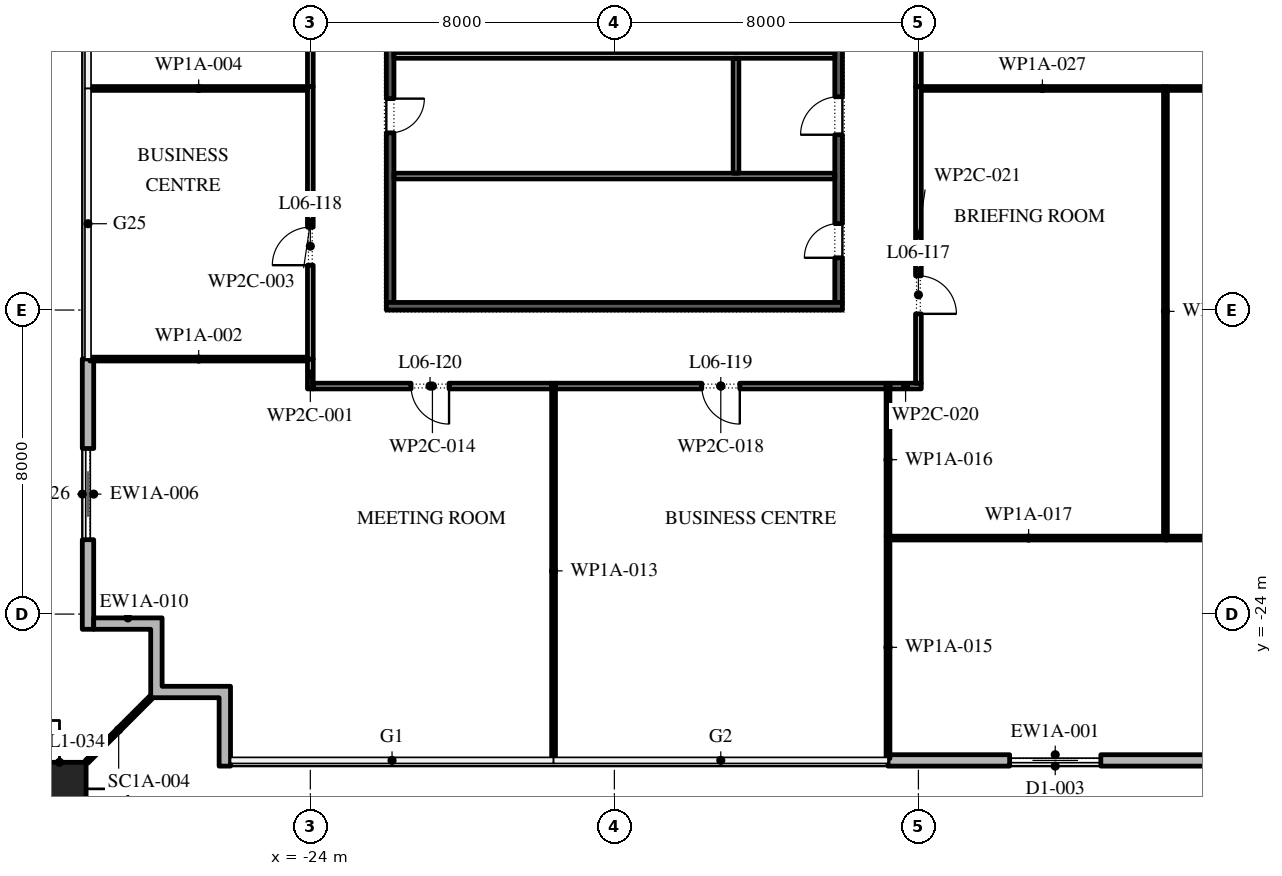
"""IFC4 building model, lengths in metres.
Left out: names, types, materials, properties, quantities, classifications, styles, units other than length and angle.
Written with IfcOpenShell. Run it as: python <this file> out.ifc"""

import sys

from ifc_helpers import new_model, si_unit, direction, frame, frame_2d, origin, origin_2d, place, context, subcontext, project, spatial, polyline, rectangle, outline, extrude, element, fill, save


model = new_model("IFC4")
c1 = context("Model", 3, precision=1e-05, world=origin(), true_north=direction((0.0, 1.0)))
c2 = subcontext(c1, "Body", "Model", "MODEL_VIEW")
j1 = project(units=[si_unit("LENGTHUNIT", "METRE"), si_unit("PLANEANGLEUNIT", "RADIAN")], contexts=[c1])
p1 = place(None, origin())
s1 = spatial("IfcSite", under=j1, at=p1, CompositionType="ELEMENT")
p2 = place(p1, origin())
s2 = spatial("IfcBuilding", under=s1, at=p2, CompositionType="ELEMENT")
p3 = place(p2, frame((0.0, 0.0, 33.6)))
s3 = spatial("IfcBuildingStorey", under=s2, at=p3, CompositionType="ELEMENT", Elevation=33.6)
p4 = place(p3, frame((-30.6, -28.6, 0.0), z_axis=(0.0, 0.0, 1.0), x_axis=(1.0, 0.0, 0.0)))
e1 = element("IfcColumn", 1, at=p4, inside=s3, PredefinedType="COLUMN", context=c2, shape_type="SweptSolid", body=[
    extrude(rectangle(XDim=1.4, YDim=1.4, at=origin_2d()), origin(), (0.0, 0.0, 1.0), 6.0),
])
p5 = place(p3, frame((-8.8, -27.85, 0.0), z_axis=(0.0, 0.0, 1.0), x_axis=(1.0, 0.0, 0.0)))
e2 = element("IfcWall", 2, at=p5, inside=s3, PredefinedType="STANDARD", context=c2, shape_type="SweptSolid", body=[
    extrude(rectangle(XDim=8.8, YDim=0.3, at=frame_2d((4.4, 0.0))), origin(), (0.0, 0.0, 1.0), 5.8),
])
p6 = place(p5, frame((3.2, 0.0, 0.0)))
e3 = element("IfcOpeningElement", 3, at=p6, cuts=e2, PredefinedType="OPENING", context=c2, shape_type="SweptSolid", body=[
    extrude(rectangle(XDim=2.4, YDim=3.5, at=frame_2d((1.2, 1.75))), frame((0.0, 0.16, 0.0), z_axis=(0.0, -1.0, 0.0), x_axis=(1.0, 0.0, 0.0)), (0.0, 0.0, 1.0), 0.32),
])
p7 = place(p3, frame((-29.85, -17.286, 0.0), z_axis=(0.0, 0.0, 1.0), x_axis=(0.0, -1.0, 0.0)))
e4 = element("IfcWall", 4, at=p7, inside=s3, PredefinedType="STANDARD", context=c2, shape_type="SweptSolid", body=[
    extrude(rectangle(XDim=7.114, YDim=0.3, at=frame_2d((3.557, 0.0))), origin(), (0.0, 0.0, 1.0), 5.8),
])
p8 = place(p7, frame((2.357, 0.0, 0.0)))
e5 = element("IfcOpeningElement", 5, at=p8, cuts=e4, PredefinedType="OPENING", context=c2, shape_type="SweptSolid", body=[
    extrude(rectangle(XDim=2.4, YDim=3.5, at=frame_2d((1.2, 1.75))), frame((0.0, 0.16, 0.0), z_axis=(0.0, -1.0, 0.0), x_axis=(1.0, 0.0, 0.0)), (0.0, 0.0, 1.0), 0.32),
])
p9 = place(p3, origin())
e6 = element("IfcWall", 6, at=p9, inside=s3, PredefinedType="STANDARD", context=c2, shape_type="SweptSolid", body=[
    extrude(outline(polyline([(-26.4, -26.2), (-28.2, -26.2), (-28.2, -24.4), (-29.7, -24.4), (-29.7, -24.1), (-27.9, -24.1), (-27.9, -25.9), (-26.1, -25.9), (-26.1, -28.0), (-26.4, -28.0), (-26.4, -26.2)])), origin(), (0.0, 0.0, 1.0), 5.8),
])
p10 = place(p3, frame((-28.2, -26.2, 0.0), z_axis=(0.0, 0.0, 1.0), x_axis=(-0.707106781187, -0.707106781187, 0.0)))
e7 = element("IfcWall", 7, at=p10, inside=s3, PredefinedType="STANDARD", context=c2, shape_type="SweptSolid", body=[
    extrude(rectangle(XDim=2.385, YDim=0.1, at=frame_2d((1.192, 0.0))), origin(), (0.0, 0.0, 1.0), 5.8),
])
p11 = place(p3, frame((-21.9, -15.8, 0.0), z_axis=(0.0, 0.0, 1.0), x_axis=(0.0, 1.0, 0.0)))
e8 = element("IfcWall", 8, at=p11, inside=s3, PredefinedType="SHEAR", context=c2, shape_type="SweptSolid", body=[
    extrude(rectangle(XDim=13.05, YDim=0.2, at=frame_2d((6.525, 0.0))), origin(), (0.0, 0.0, 1.0), 5.8),
])
p12 = place(p11, frame((4.462, 0.0, 0.0)))
e9 = element("IfcOpeningElement", 9, at=p12, cuts=e8, PredefinedType="OPENING", context=c2, shape_type="SweptSolid", body=[
    extrude(rectangle(XDim=0.9, YDim=2.1, at=frame_2d((0.45, 1.05))), frame((0.0, 0.11, 0.0), z_axis=(0.0, -1.0, 0.0), x_axis=(1.0, 0.0, 0.0)), (0.0, 0.0, 1.0), 0.22),
])
p13 = place(p3, frame((-10.1, -15.8, 0.0), z_axis=(0.0, 0.0, 1.0), x_axis=(0.0, 1.0, 0.0)))
e10 = element("IfcWall", 10, at=p13, inside=s3, PredefinedType="SHEAR", context=c2, shape_type="SweptSolid", body=[
    extrude(rectangle(XDim=13.05, YDim=0.2, at=frame_2d((6.525, 0.0))), origin(), (0.0, 0.0, 1.0), 5.8),
])
p14 = place(p13, frame((1.175, 0.0, 0.0)))
e11 = element("IfcOpeningElement", 11, at=p14, cuts=e10, PredefinedType="OPENING", context=c2, shape_type="SweptSolid", body=[
    extrude(rectangle(XDim=0.9, YDim=2.1, at=frame_2d((0.45, 1.05))), frame((0.0, 0.11, 0.0), z_axis=(0.0, -1.0, 0.0), x_axis=(1.0, 0.0, 0.0)), (0.0, 0.0, 1.0), 0.22),
])
p15 = place(p13, frame((4.413, 0.0, 0.0)))
e12 = element("IfcOpeningElement", 12, at=p15, cuts=e10, PredefinedType="OPENING", context=c2, shape_type="SweptSolid", body=[
    extrude(rectangle(XDim=1.0, YDim=2.1, at=frame_2d((0.5, 1.05))), frame((0.0, 0.11, 0.0), z_axis=(0.0, -1.0, 0.0), x_axis=(1.0, 0.0, 0.0)), (0.0, 0.0, 1.0), 0.22),
])
p16 = place(p13, frame((9.363, 0.0, 0.0)))
e13 = element("IfcOpeningElement", 13, at=p16, cuts=e10, PredefinedType="OPENING", context=c2, shape_type="SweptSolid", body=[
    extrude(rectangle(XDim=0.9, YDim=2.1, at=frame_2d((0.45, 1.05))), frame((0.0, 0.11, 0.0), z_axis=(0.0, -1.0, 0.0), x_axis=(1.0, 0.0, 0.0)), (0.0, 0.0, 1.0), 0.22),
])
p17 = place(p3, frame((-22.0, -15.9, 0.0), z_axis=(0.0, 0.0, 1.0), x_axis=(1.0, 0.0, 0.0)))
e14 = element("IfcWall", 14, at=p17, inside=s3, PredefinedType="SHEAR", context=c2, shape_type="SweptSolid", body=[
    extrude(rectangle(XDim=12.0, YDim=0.2, at=frame_2d((6.0, 0.0))), origin(), (0.0, 0.0, 1.0), 5.8),
])
for number, where, z_axis, x_axis in (
    (15, (-21.8, -9.3, 0.0), (0.0, 0.0, 1.0), (1.0, 0.0, 0.0)),
    (16, (-21.8, -12.475, 0.0), (0.0, 0.0, 1.0), (1.0, 0.0, 0.0)),
):
    element("IfcWall", number, at=place(p3, frame(where, z_axis=z_axis, x_axis=x_axis)), inside=s3, PredefinedType="PARTITIONING", context=c2, shape_type="SweptSolid", body=[
        extrude(rectangle(XDim=11.6, YDim=0.15, at=frame_2d((5.8, 0.0))), origin(), (0.0, 0.0, 1.0), 5.8),
    ])
p18 = place(p3, frame((-12.8, -12.4, 0.0), z_axis=(0.0, 0.0, 1.0), x_axis=(0.0, 1.0, 0.0)))
e17 = element("IfcWall", 17, at=p18, inside=s3, PredefinedType="PARTITIONING", context=c2, shape_type="SweptSolid", body=[
    extrude(rectangle(XDim=3.025, YDim=0.15, at=frame_2d((1.512, 0.0))), origin(), (0.0, 0.0, 1.0), 5.8),
])
p19 = place(p3, frame((-24.0, -18.075, 0.0), z_axis=(0.0, 0.0, 1.0), x_axis=(0.0, 1.0, 0.0)))
e18 = element("IfcWall", 18, at=p19, inside=s3, PredefinedType="PARTITIONING", context=c2, shape_type="SweptSolid", body=[
    extrude(rectangle(XDim=0.785, YDim=0.15, at=frame_2d((0.393, 0.0))), origin(), (0.0, 0.0, 1.0), 5.8),
])
p20 = place(p3, frame((-24.075, -17.29, 0.0), z_axis=(0.0, 0.0, 1.0), x_axis=(-1.0, 0.0, 0.0)))
e19 = element("IfcWall", 19, at=p20, inside=s3, PredefinedType="PARTITIONING", context=c2, shape_type="SweptSolid", body=[
    extrude(rectangle(XDim=5.725, YDim=0.1, at=frame_2d((2.863, 0.0))), origin(), (0.0, 0.0, 1.0), 5.8),
])
p21 = place(p3, frame((-24.0, -17.29, 0.0), z_axis=(0.0, 0.0, 1.0), x_axis=(0.0, 1.0, 0.0)))
e20 = element("IfcWall", 20, at=p21, inside=s3, PredefinedType="PARTITIONING", context=c2, shape_type="SweptSolid", body=[
    extrude(rectangle(XDim=7.17, YDim=0.15, at=frame_2d((3.585, 0.0))), origin(), (0.0, 0.0, 1.0), 5.8),
])
p22 = place(p21, frame((2.47, 0.0, 0.0)))
e21 = element("IfcOpeningElement", 21, at=p22, cuts=e20, PredefinedType="OPENING", context=c2, shape_type="SweptSolid", body=[
    extrude(rectangle(XDim=1.0, YDim=2.1, at=frame_2d((0.5, 1.05))), frame((0.0, 0.085, 0.0), z_axis=(0.0, -1.0, 0.0), x_axis=(1.0, 0.0, 0.0)), (0.0, 0.0, 1.0), 0.17),
])
p23 = place(p3, frame((-24.075, -10.17, 0.0), z_axis=(0.0, 0.0, 1.0), x_axis=(-1.0, 0.0, 0.0)))
e22 = element("IfcWall", 22, at=p23, inside=s3, PredefinedType="PARTITIONING", context=c2, shape_type="SweptSolid", body=[
    extrude(rectangle(XDim=5.725, YDim=0.1, at=frame_2d((2.863, 0.0))), origin(), (0.0, 0.0, 1.0), 5.8),
])
p24 = place(p3, frame((-24.0, -10.12, 0.0), z_axis=(0.0, 0.0, 1.0), x_axis=(0.0, 1.0, 0.0)))
e23 = element("IfcWall", 23, at=p24, inside=s3, PredefinedType="PARTITIONING", context=c2, shape_type="SweptSolid", body=[
    extrude(rectangle(XDim=7.06, YDim=0.15, at=frame_2d((3.53, 0.0))), origin(), (0.0, 0.0, 1.0), 5.8),
])
p25 = place(p24, frame((2.41, 0.0, 0.0)))
e24 = element("IfcOpeningElement", 24, at=p25, cuts=e23, PredefinedType="OPENING", context=c2, shape_type="SweptSolid", body=[
    extrude(rectangle(XDim=1.0, YDim=2.1, at=frame_2d((0.5, 1.05))), frame((0.0, 0.085, 0.0), z_axis=(0.0, -1.0, 0.0), x_axis=(1.0, 0.0, 0.0)), (0.0, 0.0, 1.0), 0.17),
])
p26 = place(p3, frame((-17.6, -27.8, 0.0), z_axis=(0.0, 0.0, 1.0), x_axis=(0.0, 1.0, 0.0)))
e25 = element("IfcWall", 25, at=p26, inside=s3, PredefinedType="PARTITIONING", context=c2, shape_type="SweptSolid", body=[
    extrude(rectangle(XDim=9.875, YDim=0.1, at=frame_2d((4.938, 0.0))), origin(), (0.0, 0.0, 1.0), 5.8),
])
p27 = place(p3, frame((-17.65, -18.0, 0.0), z_axis=(0.0, 0.0, 1.0), x_axis=(-1.0, 0.0, 0.0)))
e26 = element("IfcWall", 26, at=p27, inside=s3, PredefinedType="PARTITIONING", context=c2, shape_type="SweptSolid", body=[
    extrude(rectangle(XDim=6.275, YDim=0.15, at=frame_2d((3.138, 0.0))), origin(), (0.0, 0.0, 1.0), 5.8),
])
p28 = place(p27, frame((2.7, 0.0, 0.0)))
e27 = element("IfcOpeningElement", 27, at=p28, cuts=e26, PredefinedType="OPENING", context=c2, shape_type="SweptSolid", body=[
    extrude(rectangle(XDim=1.0, YDim=2.1, at=frame_2d((0.5, 1.05))), frame((0.0, 0.085, 0.0), z_axis=(0.0, -1.0, 0.0), x_axis=(1.0, 0.0, 0.0)), (0.0, 0.0, 1.0), 0.17),
])
p29 = place(p3, frame((-8.8, -27.8, 0.0), z_axis=(0.0, 0.0, 1.0), x_axis=(0.0, 1.0, 0.0)))
e28 = element("IfcWall", 28, at=p29, inside=s3, PredefinedType="PARTITIONING", context=c2, shape_type="SweptSolid", body=[
    extrude(rectangle(XDim=5.85, YDim=0.1, at=frame_2d((2.925, 0.0))), origin(), (0.0, 0.0, 1.0), 5.8),
])
p30 = place(p3, frame((-8.8, -21.95, 0.0), z_axis=(0.0, 0.0, 1.0), x_axis=(0.0, 1.0, 0.0)))
e29 = element("IfcWall", 29, at=p30, inside=s3, PredefinedType="PARTITIONING", context=c2, shape_type="SweptSolid", body=[
    extrude(rectangle(XDim=4.025, YDim=0.1, at=frame_2d((2.012, 0.0))), origin(), (0.0, 0.0, 1.0), 5.8),
])
p31 = place(p3, frame((-8.75, -22.0, 0.0), z_axis=(0.0, 0.0, 1.0), x_axis=(1.0, 0.0, 0.0)))
e30 = element("IfcWall", 30, at=p31, inside=s3, PredefinedType="PARTITIONING", context=c2, shape_type="SweptSolid", body=[
    extrude(rectangle(XDim=7.3, YDim=0.1, at=frame_2d((3.65, 0.0))), origin(), (0.0, 0.0, 1.0), 5.8),
])
p32 = place(p3, frame((-8.85, -18.0, 0.0), z_axis=(0.0, 0.0, 1.0), x_axis=(-1.0, 0.0, 0.0)))
e31 = element("IfcWall", 31, at=p32, inside=s3, PredefinedType="PARTITIONING", context=c2, shape_type="SweptSolid", body=[
    extrude(rectangle(XDim=8.7, YDim=0.15, at=frame_2d((4.35, 0.0))), origin(), (0.0, 0.0, 1.0), 5.8),
])
p33 = place(p32, frame((3.85, 0.0, 0.0)))
e32 = element("IfcOpeningElement", 32, at=p33, cuts=e31, PredefinedType="OPENING", context=c2, shape_type="SweptSolid", body=[
    extrude(rectangle(XDim=1.0, YDim=2.1, at=frame_2d((0.5, 1.05))), frame((0.0, 0.085, 0.0), z_axis=(0.0, -1.0, 0.0), x_axis=(1.0, 0.0, 0.0)), (0.0, 0.0, 1.0), 0.17),
])
p34 = place(p3, frame((-7.925, -18.0, 0.0), z_axis=(0.0, 0.0, 1.0), x_axis=(-1.0, 0.0, 0.0)))
e33 = element("IfcWall", 33, at=p34, inside=s3, PredefinedType="PARTITIONING", context=c2, shape_type="SweptSolid", body=[
    extrude(rectangle(XDim=0.825, YDim=0.15, at=frame_2d((0.413, 0.0))), origin(), (0.0, 0.0, 1.0), 5.8),
])
p35 = place(p3, frame((-8.0, -10.12, 0.0), z_axis=(0.0, 0.0, 1.0), x_axis=(0.0, -1.0, 0.0)))
e34 = element("IfcWall", 34, at=p35, inside=s3, PredefinedType="PARTITIONING", context=c2, shape_type="SweptSolid", body=[
    extrude(rectangle(XDim=7.805, YDim=0.15, at=frame_2d((3.902, 0.0))), origin(), (0.0, 0.0, 1.0), 5.8),
])
p36 = place(p35, frame((4.98, 0.0, 0.0)))
e35 = element("IfcOpeningElement", 35, at=p36, cuts=e34, PredefinedType="OPENING", context=c2, shape_type="SweptSolid", body=[
    extrude(rectangle(XDim=1.0, YDim=2.1, at=frame_2d((0.5, 1.05))), frame((0.0, 0.085, 0.0), z_axis=(0.0, -1.0, 0.0), x_axis=(1.0, 0.0, 0.0)), (0.0, 0.0, 1.0), 0.17),
])
p37 = place(p3, frame((-8.0, -4.925, 0.0), z_axis=(0.0, 0.0, 1.0), x_axis=(0.0, -1.0, 0.0)))
e36 = element("IfcWall", 36, at=p37, inside=s3, PredefinedType="PARTITIONING", context=c2, shape_type="SweptSolid", body=[
    extrude(rectangle(XDim=5.195, YDim=0.15, at=frame_2d((2.598, 0.0))), origin(), (0.0, 0.0, 1.0), 5.8),
])
p38 = place(p3, frame((-1.5, -21.95, 0.0), z_axis=(0.0, 0.0, 1.0), x_axis=(0.0, 1.0, 0.0)))
e37 = element("IfcWall", 37, at=p38, inside=s3, PredefinedType="PARTITIONING", context=c2, shape_type="SweptSolid", body=[
    extrude(rectangle(XDim=11.83, YDim=0.1, at=frame_2d((5.915, 0.0))), origin(), (0.0, 0.0, 1.0), 5.8),
])
p39 = place(p3, frame((-1.5, -22.0, 0.0), z_axis=(0.0, 0.0, 1.0), x_axis=(1.0, 0.0, 0.0)))
e38 = element("IfcWall", 38, at=p39, inside=s3, PredefinedType="PARTITIONING", context=c2, shape_type="SweptSolid", body=[
    extrude(rectangle(XDim=10.35, YDim=0.1, at=frame_2d((5.175, 0.0))), origin(), (0.0, 0.0, 1.0), 5.8),
])
p40 = place(p39, frame((6.7, 0.0, 0.0)))
e39 = element("IfcOpeningElement", 39, at=p40, cuts=e38, PredefinedType="OPENING", context=c2, shape_type="SweptSolid", body=[
    extrude(rectangle(XDim=0.9, YDim=2.1, at=frame_2d((0.45, 1.05))), frame((0.0, 0.06, 0.0), z_axis=(0.0, -1.0, 0.0), x_axis=(1.0, 0.0, 0.0)), (0.0, 0.0, 1.0), 0.12),
])
p41 = place(p3, frame((-1.55, -10.17, 0.0), z_axis=(0.0, 0.0, 1.0), x_axis=(-1.0, 0.0, 0.0)))
e40 = element("IfcWall", 40, at=p41, inside=s3, PredefinedType="PARTITIONING", context=c2, shape_type="SweptSolid", body=[
    extrude(rectangle(XDim=6.375, YDim=0.1, at=frame_2d((3.188, 0.0))), origin(), (0.0, 0.0, 1.0), 5.8),
])
p42 = place(p3, frame((7.925, -10.17, 0.0), z_axis=(0.0, 0.0, 1.0), x_axis=(-1.0, 0.0, 0.0)))
e41 = element("IfcWall", 41, at=p42, inside=s3, PredefinedType="PARTITIONING", context=c2, shape_type="SweptSolid", body=[
    extrude(rectangle(XDim=9.375, YDim=0.1, at=frame_2d((4.688, 0.0))), origin(), (0.0, 0.0, 1.0), 5.8),
])
p43 = place(p6, origin())
e42 = element("IfcDoor", 42, at=p43, inside=s3, OperationType="DOUBLE_DOOR_SLIDING", PredefinedType="DOOR", context=c2, shape_type="SweptSolid", body=[
    extrude(rectangle(XDim=2.4, YDim=3.5, at=frame_2d((1.2, 1.75))), frame((0.0, 0.025, 0.0), z_axis=(0.0, -1.0, 0.0), x_axis=(1.0, 0.0, 0.0)), (0.0, 0.0, 1.0), 0.05),
])
fill(e3, e42)
p44 = place(p8, origin())
e43 = element("IfcDoor", 43, at=p44, inside=s3, OperationType="DOUBLE_DOOR_SLIDING", PredefinedType="DOOR", context=c2, shape_type="SweptSolid", body=[
    extrude(rectangle(XDim=2.4, YDim=3.5, at=frame_2d((1.2, 1.75))), frame((0.0, 0.025, 0.0), z_axis=(0.0, -1.0, 0.0), x_axis=(1.0, 0.0, 0.0)), (0.0, 0.0, 1.0), 0.05),
])
fill(e5, e43)
p45 = place(p14, origin())
e44 = element("IfcDoor", 44, at=p45, inside=s3, OperationType="SINGLE_SWING_RIGHT", PredefinedType="DOOR", context=c2, shape_type="SweptSolid", body=[
    extrude(rectangle(XDim=0.9, YDim=2.1, at=frame_2d((0.45, 1.05))), frame((0.0, 0.1, 0.0), z_axis=(0.0, -1.0, 0.0), x_axis=(1.0, 0.0, 0.0)), (0.0, 0.0, 1.0), 0.05),
])
fill(e11, e44)
p46 = place(p15, origin())
e45 = element("IfcDoor", 45, at=p46, inside=s3, OperationType="SINGLE_SWING_RIGHT", PredefinedType="DOOR", context=c2, shape_type="SweptSolid", body=[
    extrude(rectangle(XDim=1.0, YDim=2.1, at=frame_2d((0.5, 1.05))), frame((0.0, 0.1, 0.0), z_axis=(0.0, -1.0, 0.0), x_axis=(1.0, 0.0, 0.0)), (0.0, 0.0, 1.0), 0.05),
])
fill(e12, e45)
p47 = place(p12, frame((0.9, -0.15, 0.0), z_axis=(0.0, 0.0, 1.0), x_axis=(-1.0, 0.0, 0.0)))
e46 = element("IfcDoor", 46, at=p47, inside=s3, OperationType="SINGLE_SWING_RIGHT", PredefinedType="DOOR", context=c2, shape_type="SweptSolid", body=[
    extrude(rectangle(XDim=0.9, YDim=2.1, at=frame_2d((0.45, 1.05))), frame((0.0, -0.05, 0.0), z_axis=(0.0, -1.0, 0.0), x_axis=(1.0, 0.0, 0.0)), (0.0, 0.0, 1.0), 0.05),
])
fill(e9, e46)
p48 = place(p36, origin())
e47 = element("IfcDoor", 47, at=p48, inside=s3, OperationType="SINGLE_SWING_LEFT", PredefinedType="DOOR", context=c2, shape_type="SweptSolid", body=[
    extrude(rectangle(XDim=1.0, YDim=2.1, at=frame_2d((0.5, 1.05))), frame((0.0, 0.025, 0.0), z_axis=(0.0, -1.0, 0.0), x_axis=(1.0, 0.0, 0.0)), (0.0, 0.0, 1.0), 0.05),
])
fill(e35, e47)
p49 = place(p22, origin())
e48 = element("IfcDoor", 48, at=p49, inside=s3, OperationType="SINGLE_SWING_RIGHT", PredefinedType="DOOR", context=c2, shape_type="SweptSolid", body=[
    extrude(rectangle(XDim=1.0, YDim=2.1, at=frame_2d((0.5, 1.05))), frame((0.0, 0.025, 0.0), z_axis=(0.0, -1.0, 0.0), x_axis=(1.0, 0.0, 0.0)), (0.0, 0.0, 1.0), 0.05),
])
fill(e21, e48)
p50 = place(p33, origin())
e49 = element("IfcDoor", 49, at=p50, inside=s3, OperationType="SINGLE_SWING_RIGHT", PredefinedType="DOOR", context=c2, shape_type="SweptSolid", body=[
    extrude(rectangle(XDim=1.0, YDim=2.1, at=frame_2d((0.5, 1.05))), frame((0.0, 0.025, 0.0), z_axis=(0.0, -1.0, 0.0), x_axis=(1.0, 0.0, 0.0)), (0.0, 0.0, 1.0), 0.05),
])
fill(e32, e49)
p51 = place(p28, origin())
e50 = element("IfcDoor", 50, at=p51, inside=s3, OperationType="SINGLE_SWING_RIGHT", PredefinedType="DOOR", context=c2, shape_type="SweptSolid", body=[
    extrude(rectangle(XDim=1.0, YDim=2.1, at=frame_2d((0.5, 1.05))), frame((0.0, 0.025, 0.0), z_axis=(0.0, -1.0, 0.0), x_axis=(1.0, 0.0, 0.0)), (0.0, 0.0, 1.0), 0.05),
])
fill(e27, e50)
save(model, sys.argv[1])
